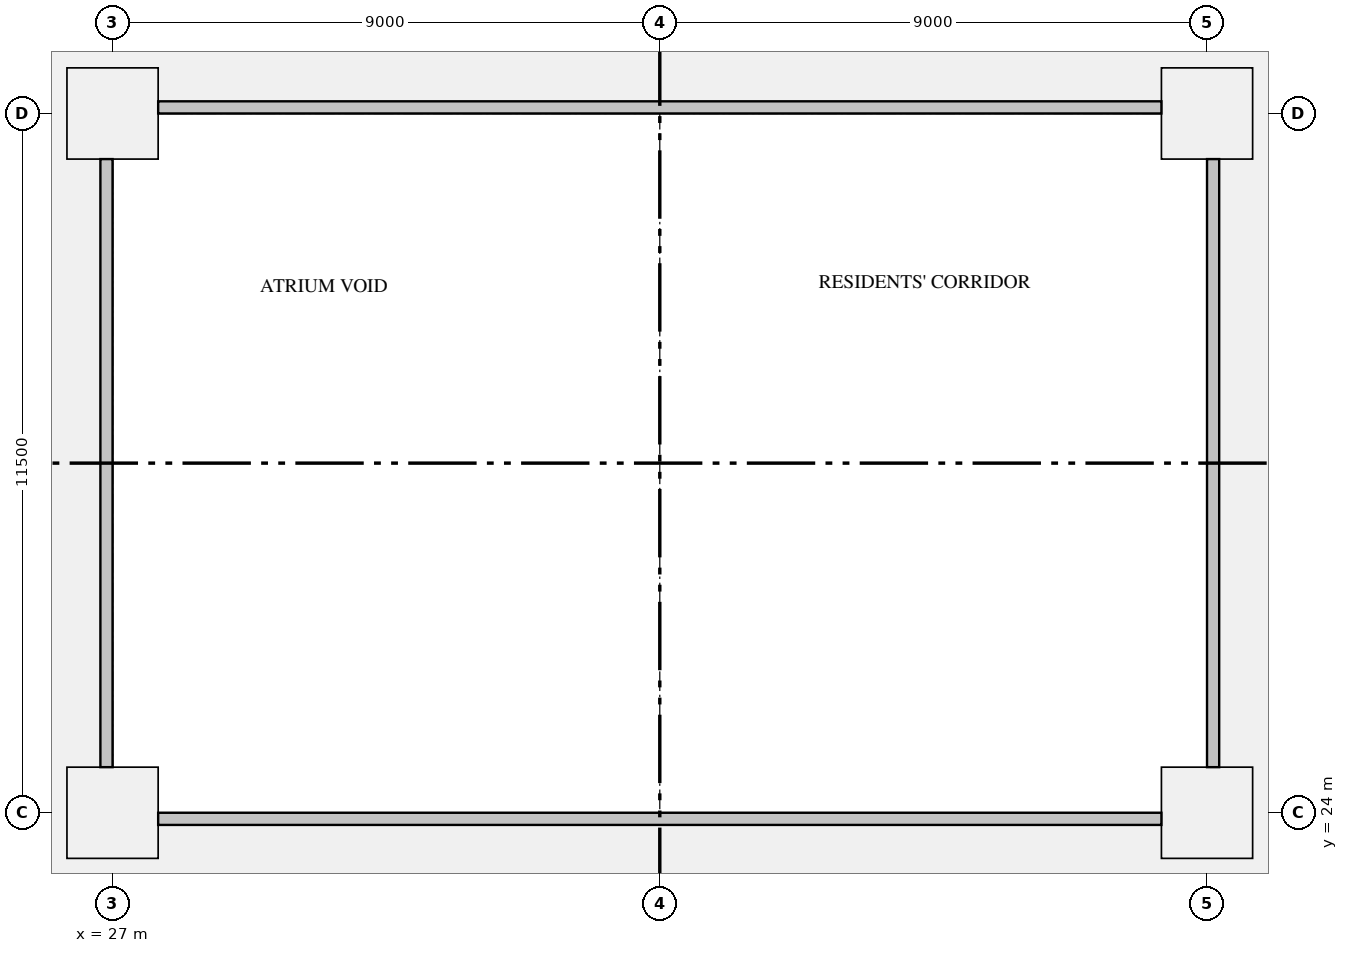
"""IFC4 building model, lengths in metres.
Left out: names, types, materials, properties, quantities, classifications, styles, units other than length and angle.
Written with IfcOpenShell. Run it as: python <this file> out.ifc"""

import sys

from ifc_helpers import new_model, si_unit, direction, frame, origin, origin_2d, place, context, subcontext, project, spatial, rectangle, extrude, element, save


model = new_model("IFC4")
c1 = context("Model", 3, precision=1e-05, world=origin(), true_north=direction((0.0, 1.0)))
c2 = subcontext(c1, "Body", "Model", "MODEL_VIEW")
j1 = project(units=[si_unit("LENGTHUNIT", "METRE"), si_unit("PLANEANGLEUNIT", "RADIAN")], contexts=[c1])
p1 = place(None, origin())
s1 = spatial("IfcSite", under=j1, at=p1, CompositionType="ELEMENT")
p2 = place(p1, origin())
s2 = spatial("IfcBuilding", under=s1, at=p2, CompositionType="ELEMENT")
p3 = place(p2, frame((0.0, 0.0, 54.15)))
s3 = spatial("IfcBuildingStorey", under=s2, at=p3, CompositionType="ELEMENT", Elevation=54.15)
for number, where, z_axis, x_axis in (
    (1, (27.0, 24.0, 0.0), (0.0, 0.0, 1.0), (1.0, 0.0, 0.0)),
    (2, (45.0, 24.0, 0.0), (0.0, 0.0, 1.0), (1.0, 0.0, 0.0)),
    (3, (27.0, 35.5, 0.0), (0.0, 0.0, 1.0), (1.0, 0.0, 0.0)),
    (4, (45.0, 35.5, 0.0), (0.0, 0.0, 1.0), (1.0, 0.0, 0.0)),
):
    element("IfcColumn", number, at=place(p3, frame(where, z_axis=z_axis, x_axis=x_axis)), inside=s3, PredefinedType="COLUMN", context=c2, shape_type="SweptSolid", body=[
        extrude(rectangle(XDim=1.5, YDim=1.5, at=origin_2d()), origin(), (0.0, 0.0, 1.0), 3.15),
    ])
save(model, sys.argv[1])
